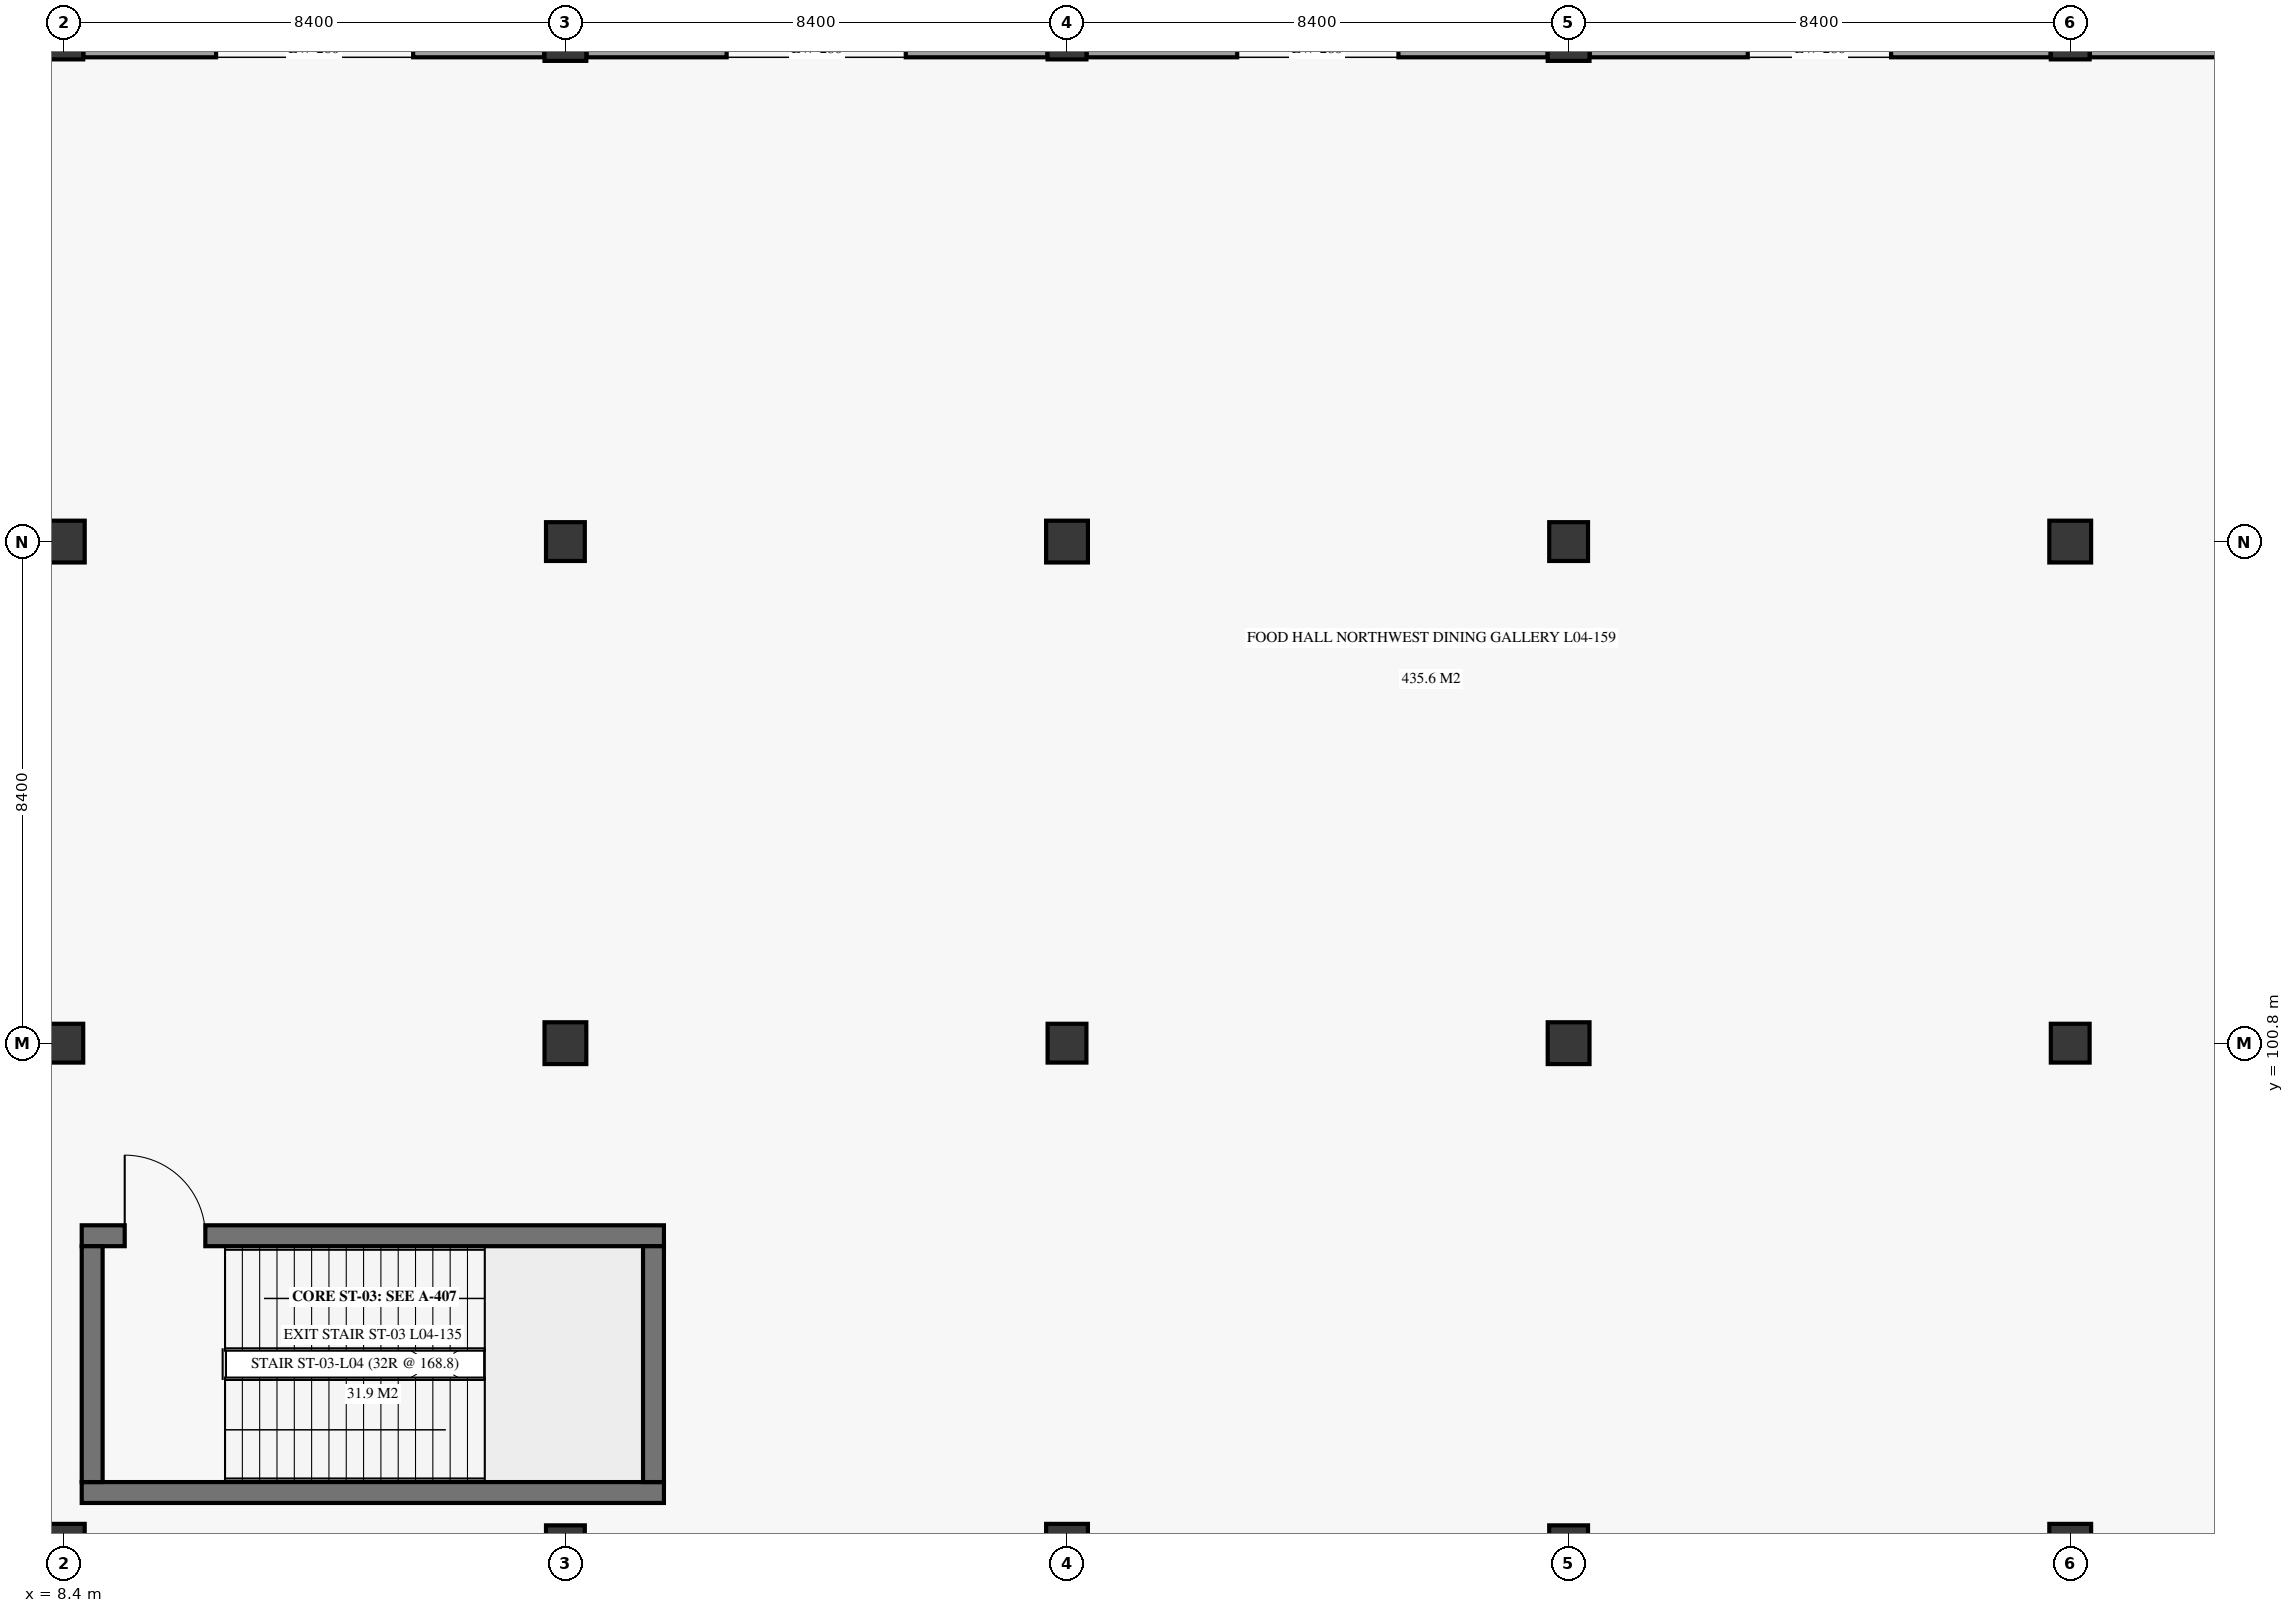
"""IFC4 building model, lengths in metres.
Left out: names, types, materials, properties, quantities, classifications, styles, units other than length and angle.
Written with IfcOpenShell. Run it as: python <this file> out.ifc"""

import sys

from ifc_helpers import new_model, si_unit, direction, frame, frame_2d, origin, origin_2d, place, context, subcontext, project, spatial, rectangle, extrude, element, fill, save


model = new_model("IFC4")
c1 = context("Model", 3, precision=1e-05, world=origin(), true_north=direction((0.0, 1.0)))
c2 = subcontext(c1, "Body", "Model", "MODEL_VIEW")
j1 = project(units=[si_unit("LENGTHUNIT", "METRE"), si_unit("PLANEANGLEUNIT", "RADIAN")], contexts=[c1])
p1 = place(None, origin())
s1 = spatial("IfcSite", under=j1, at=p1, CompositionType="ELEMENT")
p2 = place(p1, origin())
s2 = spatial("IfcBuilding", under=s1, at=p2, CompositionType="ELEMENT")
p3 = place(p2, frame((0.0, 0.0, 16.8)))
s3 = spatial("IfcBuildingStorey", under=s2, at=p3, CompositionType="ELEMENT", Elevation=16.8)
p4 = place(p3, frame((8.4, 92.4, 0.0), z_axis=(0.0, 0.0, 1.0), x_axis=(1.0, 0.0, 0.0)))
e1 = element("IfcColumn", 1, at=p4, inside=s3, PredefinedType="COLUMN", context=c2, shape_type="SweptSolid", body=[
    extrude(rectangle(XDim=0.7, YDim=0.7, at=origin_2d()), origin(), (0.0, 0.0, 1.0), 5.1),
])
p5 = place(p3, frame((8.4, 100.8, 0.0), z_axis=(0.0, 0.0, 1.0), x_axis=(1.0, 0.0, 0.0)))
e2 = element("IfcColumn", 2, at=p5, inside=s3, PredefinedType="COLUMN", context=c2, shape_type="SweptSolid", body=[
    extrude(rectangle(XDim=0.65, YDim=0.65, at=origin_2d()), origin(), (0.0, 0.0, 1.0), 5.1),
])
p6 = place(p3, frame((8.4, 109.2, 0.0), z_axis=(0.0, 0.0, 1.0), x_axis=(1.0, 0.0, 0.0)))
e3 = element("IfcColumn", 3, at=p6, inside=s3, PredefinedType="COLUMN", context=c2, shape_type="SweptSolid", body=[
    extrude(rectangle(XDim=0.7, YDim=0.7, at=origin_2d()), origin(), (0.0, 0.0, 1.0), 5.1),
])
for number, where, z_axis, x_axis in (
    (4, (8.4, 117.6, 0.0), (0.0, 0.0, 1.0), (1.0, 0.0, 0.0)),
    (5, (16.8, 92.4, 0.0), (0.0, 0.0, 1.0), (1.0, 0.0, 0.0)),
):
    element("IfcColumn", number, at=place(p3, frame(where, z_axis=z_axis, x_axis=x_axis)), inside=s3, PredefinedType="COLUMN", context=c2, shape_type="SweptSolid", body=[
        extrude(rectangle(XDim=0.65, YDim=0.65, at=origin_2d()), origin(), (0.0, 0.0, 1.0), 5.1),
    ])
p7 = place(p3, frame((16.8, 100.8, 0.0), z_axis=(0.0, 0.0, 1.0), x_axis=(1.0, 0.0, 0.0)))
e6 = element("IfcColumn", 6, at=p7, inside=s3, PredefinedType="COLUMN", context=c2, shape_type="SweptSolid", body=[
    extrude(rectangle(XDim=0.7, YDim=0.7, at=origin_2d()), origin(), (0.0, 0.0, 1.0), 5.1),
])
p8 = place(p3, frame((16.8, 109.2, 0.0), z_axis=(0.0, 0.0, 1.0), x_axis=(1.0, 0.0, 0.0)))
e7 = element("IfcColumn", 7, at=p8, inside=s3, PredefinedType="COLUMN", context=c2, shape_type="SweptSolid", body=[
    extrude(rectangle(XDim=0.65, YDim=0.65, at=origin_2d()), origin(), (0.0, 0.0, 1.0), 5.1),
])
for number, where, z_axis, x_axis in (
    (8, (16.8, 117.6, 0.0), (0.0, 0.0, 1.0), (1.0, 0.0, 0.0)),
    (9, (25.2, 92.4, 0.0), (0.0, 0.0, 1.0), (1.0, 0.0, 0.0)),
):
    element("IfcColumn", number, at=place(p3, frame(where, z_axis=z_axis, x_axis=x_axis)), inside=s3, PredefinedType="COLUMN", context=c2, shape_type="SweptSolid", body=[
        extrude(rectangle(XDim=0.7, YDim=0.7, at=origin_2d()), origin(), (0.0, 0.0, 1.0), 5.1),
    ])
p9 = place(p3, frame((25.2, 100.8, 0.0), z_axis=(0.0, 0.0, 1.0), x_axis=(1.0, 0.0, 0.0)))
e10 = element("IfcColumn", 10, at=p9, inside=s3, PredefinedType="COLUMN", context=c2, shape_type="SweptSolid", body=[
    extrude(rectangle(XDim=0.65, YDim=0.65, at=origin_2d()), origin(), (0.0, 0.0, 1.0), 5.1),
])
p10 = place(p3, frame((25.2, 109.2, 0.0), z_axis=(0.0, 0.0, 1.0), x_axis=(1.0, 0.0, 0.0)))
e11 = element("IfcColumn", 11, at=p10, inside=s3, PredefinedType="COLUMN", context=c2, shape_type="SweptSolid", body=[
    extrude(rectangle(XDim=0.7, YDim=0.7, at=origin_2d()), origin(), (0.0, 0.0, 1.0), 5.1),
])
for number, where, z_axis, x_axis in (
    (12, (25.2, 117.6, 0.0), (0.0, 0.0, 1.0), (1.0, 0.0, 0.0)),
    (13, (33.6, 92.4, 0.0), (0.0, 0.0, 1.0), (1.0, 0.0, 0.0)),
):
    element("IfcColumn", number, at=place(p3, frame(where, z_axis=z_axis, x_axis=x_axis)), inside=s3, PredefinedType="COLUMN", context=c2, shape_type="SweptSolid", body=[
        extrude(rectangle(XDim=0.65, YDim=0.65, at=origin_2d()), origin(), (0.0, 0.0, 1.0), 5.1),
    ])
p11 = place(p3, frame((33.6, 100.8, 0.0), z_axis=(0.0, 0.0, 1.0), x_axis=(1.0, 0.0, 0.0)))
e14 = element("IfcColumn", 14, at=p11, inside=s3, PredefinedType="COLUMN", context=c2, shape_type="SweptSolid", body=[
    extrude(rectangle(XDim=0.7, YDim=0.7, at=origin_2d()), origin(), (0.0, 0.0, 1.0), 5.1),
])
p12 = place(p3, frame((33.6, 109.2, 0.0), z_axis=(0.0, 0.0, 1.0), x_axis=(1.0, 0.0, 0.0)))
e15 = element("IfcColumn", 15, at=p12, inside=s3, PredefinedType="COLUMN", context=c2, shape_type="SweptSolid", body=[
    extrude(rectangle(XDim=0.65, YDim=0.65, at=origin_2d()), origin(), (0.0, 0.0, 1.0), 5.1),
])
for number, where, z_axis, x_axis in (
    (16, (33.6, 117.6, 0.0), (0.0, 0.0, 1.0), (1.0, 0.0, 0.0)),
    (17, (42.0, 92.4, 0.0), (0.0, 0.0, 1.0), (1.0, 0.0, 0.0)),
):
    element("IfcColumn", number, at=place(p3, frame(where, z_axis=z_axis, x_axis=x_axis)), inside=s3, PredefinedType="COLUMN", context=c2, shape_type="SweptSolid", body=[
        extrude(rectangle(XDim=0.7, YDim=0.7, at=origin_2d()), origin(), (0.0, 0.0, 1.0), 5.1),
    ])
p13 = place(p3, frame((42.0, 100.8, 0.0), z_axis=(0.0, 0.0, 1.0), x_axis=(1.0, 0.0, 0.0)))
e18 = element("IfcColumn", 18, at=p13, inside=s3, PredefinedType="COLUMN", context=c2, shape_type="SweptSolid", body=[
    extrude(rectangle(XDim=0.65, YDim=0.65, at=origin_2d()), origin(), (0.0, 0.0, 1.0), 5.1),
])
p14 = place(p3, frame((42.0, 109.2, 0.0), z_axis=(0.0, 0.0, 1.0), x_axis=(1.0, 0.0, 0.0)))
e19 = element("IfcColumn", 19, at=p14, inside=s3, PredefinedType="COLUMN", context=c2, shape_type="SweptSolid", body=[
    extrude(rectangle(XDim=0.7, YDim=0.7, at=origin_2d()), origin(), (0.0, 0.0, 1.0), 5.1),
])
p15 = place(p3, frame((42.0, 117.6, 0.0), z_axis=(0.0, 0.0, 1.0), x_axis=(1.0, 0.0, 0.0)))
e20 = element("IfcColumn", 20, at=p15, inside=s3, PredefinedType="COLUMN", context=c2, shape_type="SweptSolid", body=[
    extrude(rectangle(XDim=0.65, YDim=0.65, at=origin_2d()), origin(), (0.0, 0.0, 1.0), 5.1),
])
p16 = place(p3, frame((8.728, 117.45, 0.0), z_axis=(0.0, 0.0, 1.0), x_axis=(1.0, 0.0, 0.0)))
e21 = element("IfcWall", 21, at=p16, inside=s3, PredefinedType="SOLIDWALL", context=c2, shape_type="SweptSolid", body=[
    extrude(rectangle(XDim=7.718, YDim=0.28, at=frame_2d((3.859, 0.0))), origin(), (0.0, 0.0, 1.0), 4.38),
])
p17 = place(p16, frame((2.222, 0.0, 0.95)))
e22 = element("IfcOpeningElement", 22, at=p17, cuts=e21, PredefinedType="OPENING", context=c2, shape_type="SweptSolid", body=[
    extrude(rectangle(XDim=3.3, YDim=2.3, at=frame_2d((1.65, 1.15))), frame((0.0, 0.15, 0.0), z_axis=(0.0, -1.0, 0.0), x_axis=(1.0, 0.0, 0.0)), (0.0, 0.0, 1.0), 0.3),
])
p18 = place(p3, frame((17.154, 117.45, 0.0), z_axis=(0.0, 0.0, 1.0), x_axis=(1.0, 0.0, 0.0)))
e23 = element("IfcWall", 23, at=p18, inside=s3, PredefinedType="SOLIDWALL", context=c2, shape_type="SweptSolid", body=[
    extrude(rectangle(XDim=7.718, YDim=0.28, at=frame_2d((3.859, 0.0))), origin(), (0.0, 0.0, 1.0), 4.38),
])
p19 = place(p18, frame((2.346, 0.0, 0.95)))
e24 = element("IfcOpeningElement", 24, at=p19, cuts=e23, PredefinedType="OPENING", context=c2, shape_type="SweptSolid", body=[
    extrude(rectangle(XDim=3.0, YDim=2.25, at=frame_2d((1.5, 1.125))), frame((0.0, 0.15, 0.0), z_axis=(0.0, -1.0, 0.0), x_axis=(1.0, 0.0, 0.0)), (0.0, 0.0, 1.0), 0.3),
])
p20 = place(p3, frame((25.528, 117.45, 0.0), z_axis=(0.0, 0.0, 1.0), x_axis=(1.0, 0.0, 0.0)))
e25 = element("IfcWall", 25, at=p20, inside=s3, PredefinedType="SOLIDWALL", context=c2, shape_type="SweptSolid", body=[
    extrude(rectangle(XDim=7.72, YDim=0.28, at=frame_2d((3.86, 0.0))), origin(), (0.0, 0.0, 1.0), 4.38),
])
p21 = place(p20, frame((2.522, 0.0, 0.95)))
e26 = element("IfcOpeningElement", 26, at=p21, cuts=e25, PredefinedType="OPENING", context=c2, shape_type="SweptSolid", body=[
    extrude(rectangle(XDim=2.7, YDim=2.2, at=frame_2d((1.35, 1.1))), frame((0.0, 0.15, 0.0), z_axis=(0.0, -1.0, 0.0), x_axis=(1.0, 0.0, 0.0)), (0.0, 0.0, 1.0), 0.3),
])
p22 = place(p3, frame((33.954, 117.45, 0.0), z_axis=(0.0, 0.0, 1.0), x_axis=(1.0, 0.0, 0.0)))
e27 = element("IfcWall", 27, at=p22, inside=s3, PredefinedType="SOLIDWALL", context=c2, shape_type="SweptSolid", body=[
    extrude(rectangle(XDim=7.718, YDim=0.28, at=frame_2d((3.859, 0.0))), origin(), (0.0, 0.0, 1.0), 4.38),
])
p23 = place(p22, frame((2.646, 0.0, 0.95)))
e28 = element("IfcOpeningElement", 28, at=p23, cuts=e27, PredefinedType="OPENING", context=c2, shape_type="SweptSolid", body=[
    extrude(rectangle(XDim=2.4, YDim=2.2, at=frame_2d((1.2, 1.1))), frame((0.0, 0.15, 0.0), z_axis=(0.0, -1.0, 0.0), x_axis=(1.0, 0.0, 0.0)), (0.0, 0.0, 1.0), 0.3),
])
p24 = place(p3, frame((42.328, 117.45, 0.0), z_axis=(0.0, 0.0, 1.0), x_axis=(1.0, 0.0, 0.0)))
e29 = element("IfcWall", 29, at=p24, inside=s3, PredefinedType="SOLIDWALL", context=c2, shape_type="SweptSolid", body=[
    extrude(rectangle(XDim=7.718, YDim=0.28, at=frame_2d((3.859, 0.0))), origin(), (0.0, 0.0, 1.0), 4.38),
])
p25 = place(p24, frame((2.822, 0.0, 0.95)))
e30 = element("IfcOpeningElement", 30, at=p25, cuts=e29, PredefinedType="OPENING", context=c2, shape_type="SweptSolid", body=[
    extrude(rectangle(XDim=2.1, YDim=2.1, at=frame_2d((1.05, 1.05))), frame((0.0, 0.15, 0.0), z_axis=(0.0, -1.0, 0.0), x_axis=(1.0, 0.0, 0.0)), (0.0, 0.0, 1.0), 0.3),
])
p26 = place(p3, frame((8.7, 93.275, 0.0), z_axis=(0.0, 0.0, 1.0), x_axis=(1.0, 0.0, 0.0)))
e31 = element("IfcWall", 31, at=p26, inside=s3, PredefinedType="SHEAR", context=c2, shape_type="SweptSolid", body=[
    extrude(rectangle(XDim=9.75, YDim=0.35, at=frame_2d((4.875, 0.0))), origin(), (0.0, 0.0, 1.0), 5.1),
])
p27 = place(p3, frame((8.7, 97.575, 0.0), z_axis=(0.0, 0.0, 1.0), x_axis=(1.0, 0.0, 0.0)))
e32 = element("IfcWall", 32, at=p27, inside=s3, PredefinedType="SHEAR", context=c2, shape_type="SweptSolid", body=[
    extrude(rectangle(XDim=9.75, YDim=0.35, at=frame_2d((4.875, 0.0))), origin(), (0.0, 0.0, 1.0), 5.1),
])
p28 = place(p27, frame((0.72, 0.0, 0.0)))
e33 = element("IfcOpeningElement", 33, at=p28, cuts=e32, PredefinedType="OPENING", context=c2, shape_type="SweptSolid", body=[
    extrude(rectangle(XDim=1.35, YDim=2.25, at=frame_2d((0.675, 1.125))), frame((0.0, 0.185, 0.0), z_axis=(0.0, -1.0, 0.0), x_axis=(1.0, 0.0, 0.0)), (0.0, 0.0, 1.0), 0.37),
])
for number, where, z_axis, x_axis in (
    (34, (8.875, 93.45, 0.0), (0.0, 0.0, 1.0), (0.0, 1.0, 0.0)),
    (35, (18.275, 93.45, 0.0), (0.0, 0.0, 1.0), (0.0, 1.0, 0.0)),
):
    element("IfcWall", number, at=place(p3, frame(where, z_axis=z_axis, x_axis=x_axis)), inside=s3, PredefinedType="SHEAR", context=c2, shape_type="SweptSolid", body=[
        extrude(rectangle(XDim=3.95, YDim=0.35, at=frame_2d((1.975, 0.0))), origin(), (0.0, 0.0, 1.0), 5.1),
    ])
p29 = place(p28, origin())
e36 = element("IfcDoor", 36, at=p29, inside=s3, OperationType="SINGLE_SWING_LEFT", PredefinedType="DOOR", context=c2, shape_type="SweptSolid", body=[
    extrude(rectangle(XDim=1.35, YDim=2.25, at=frame_2d((0.675, 1.125))), frame((0.0, 0.025, 0.0), z_axis=(0.0, -1.0, 0.0), x_axis=(1.0, 0.0, 0.0)), (0.0, 0.0, 1.0), 0.05),
])
fill(e33, e36)
save(model, sys.argv[1])
